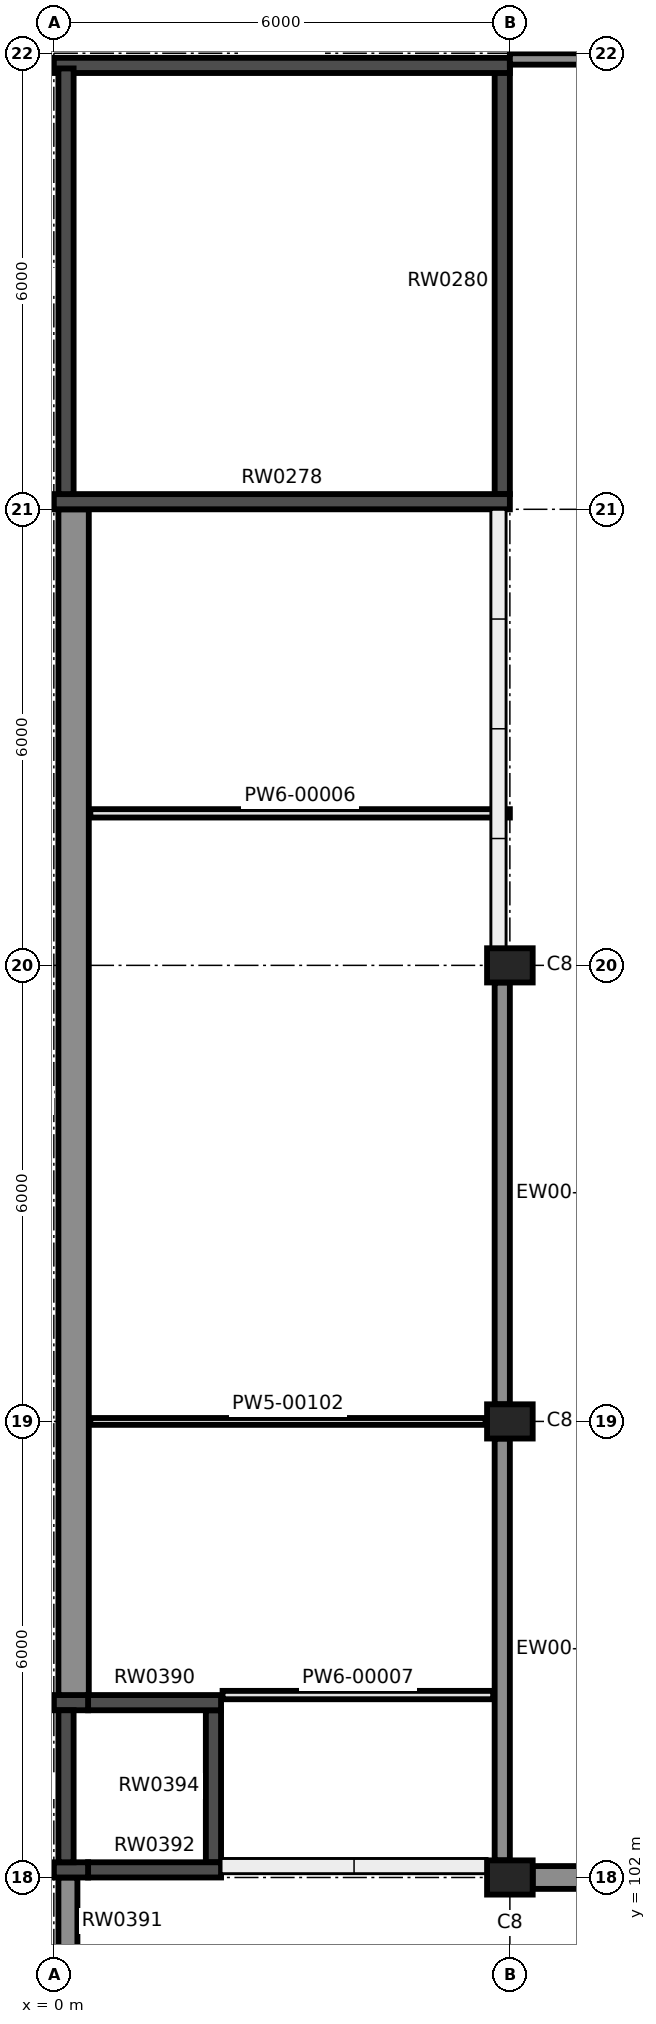
"""IFC4 building model, lengths in metres.
Left out: names, types, materials, properties, quantities, classifications, styles, units other than length and angle.
Written with IfcOpenShell. Run it as: python <this file> out.ifc"""

import sys

from ifc_helpers import new_model, si_unit, direction, frame, frame_2d, origin, origin_2d, place, context, subcontext, project, spatial, polyline, rectangle, outline, extrude, element, fill, save


model = new_model("IFC4")
c1 = context("Model", 3, precision=1e-05, world=origin(), true_north=direction((0.0, 1.0)))
c2 = subcontext(c1, "Body", "Model", "MODEL_VIEW")
j1 = project(units=[si_unit("LENGTHUNIT", "METRE"), si_unit("PLANEANGLEUNIT", "RADIAN")], contexts=[c1])
p1 = place(None, origin())
s1 = spatial("IfcSite", under=j1, at=p1, CompositionType="ELEMENT")
p2 = place(p1, origin())
s2 = spatial("IfcBuilding", under=s1, at=p2, CompositionType="ELEMENT")
p3 = place(p2, origin())
s3 = spatial("IfcBuildingStorey", under=s2, at=p3, CompositionType="ELEMENT", Elevation=0.0)
for number, where, z_axis, x_axis in (
    (1, (6.0, 102.0, -0.3), (0.0, 0.0, 1.0), (1.0, 0.0, 0.0)),
    (2, (6.0, 108.0, -0.3), (0.0, 0.0, 1.0), (1.0, 0.0, 0.0)),
    (3, (6.0, 114.0, -0.3), (0.0, 0.0, 1.0), (1.0, 0.0, 0.0)),
):
    element("IfcColumn", number, at=place(p3, frame(where, z_axis=z_axis, x_axis=x_axis)), inside=s3, PredefinedType="COLUMN", context=c2, shape_type="SweptSolid", body=[
        extrude(rectangle(XDim=0.6, YDim=0.45, at=origin_2d()), origin(), (0.0, 0.0, 1.0), 7.3),
    ])
p4 = place(p3, frame((0.0, 125.84, -0.3), z_axis=(0.0, 0.0, 1.0), x_axis=(1.0, 0.0, 0.0)))
e4 = element("IfcWall", 4, at=p4, inside=s3, PredefinedType="SHEAR", context=c2, shape_type="SweptSolid", body=[
    extrude(rectangle(XDim=6.0, YDim=0.2, at=frame_2d((3.0, 0.0))), origin(), (0.0, 0.0, 1.0), 7.3),
])
p5 = place(p4, frame((2.1, 0.0, 0.3)))
e5 = element("IfcOpeningElement", 5, at=p5, cuts=e4, PredefinedType="OPENING", context=c2, shape_type="SweptSolid", body=[
    extrude(rectangle(XDim=1.8, YDim=2.4, at=frame_2d((0.9, 1.2))), frame((0.0, 0.11, 0.0), z_axis=(0.0, -1.0, 0.0), x_axis=(1.0, 0.0, 0.0)), (0.0, 0.0, 1.0), 0.22),
])
p6 = place(p3, frame((0.0, 120.1, -0.3), z_axis=(0.0, 0.0, 1.0), x_axis=(1.0, 0.0, 0.0)))
e6 = element("IfcWall", 6, at=p6, inside=s3, PredefinedType="SHEAR", context=c2, shape_type="SweptSolid", body=[
    extrude(rectangle(XDim=6.0, YDim=0.2, at=frame_2d((3.0, 0.0))), origin(), (0.0, 0.0, 1.0), 7.3),
])
for number, where, z_axis, x_axis in (
    (7, (0.16, 120.2, -0.3), (0.0, 0.0, 1.0), (0.0, 1.0, 0.0)),
    (8, (5.9, 120.2, -0.3), (0.0, 0.0, 1.0), (0.0, 1.0, 0.0)),
):
    element("IfcWall", number, at=place(p3, frame(where, z_axis=z_axis, x_axis=x_axis)), inside=s3, PredefinedType="SHEAR", context=c2, shape_type="SweptSolid", body=[
        extrude(rectangle(XDim=5.6, YDim=0.2, at=frame_2d((2.8, 0.0))), origin(), (0.0, 0.0, 1.0), 7.3),
    ])
p7 = place(p3, frame((0.0, 104.3, -0.3), z_axis=(0.0, 0.0, 1.0), x_axis=(1.0, 0.0, 0.0)))
e9 = element("IfcWall", 9, at=p7, inside=s3, PredefinedType="SHEAR", context=c2, shape_type="SweptSolid", body=[
    extrude(rectangle(XDim=0.45, YDim=0.2, at=frame_2d((0.225, 0.0))), origin(), (0.0, 0.0, 1.0), 7.3),
])
p8 = place(p3, frame((0.45, 104.3, -1.4), z_axis=(0.0, 0.0, 1.0), x_axis=(1.0, 0.0, 0.0)))
e10 = element("IfcWall", 10, at=p8, inside=s3, PredefinedType="SHEAR", context=c2, shape_type="SweptSolid", body=[
    extrude(rectangle(XDim=1.75, YDim=0.2, at=frame_2d((0.875, 0.0))), origin(), (0.0, 0.0, 1.0), 8.4),
])
p9 = place(p8, frame((0.1, 0.0, 1.4)))
e11 = element("IfcOpeningElement", 11, at=p9, cuts=e10, PredefinedType="OPENING", context=c2, shape_type="SweptSolid", body=[
    extrude(rectangle(XDim=1.1, YDim=2.1, at=frame_2d((0.55, 1.05))), frame((0.0, 0.11, 0.0), z_axis=(0.0, -1.0, 0.0), x_axis=(1.0, 0.0, 0.0)), (0.0, 0.0, 1.0), 0.22),
])
p10 = place(p3, frame((0.0, 102.1, -0.3), z_axis=(0.0, 0.0, 1.0), x_axis=(1.0, 0.0, 0.0)))
e12 = element("IfcWall", 12, at=p10, inside=s3, PredefinedType="SHEAR", context=c2, shape_type="SweptSolid", body=[
    extrude(rectangle(XDim=0.45, YDim=0.2, at=frame_2d((0.225, 0.0))), origin(), (0.0, 0.0, 1.0), 7.3),
])
p11 = place(p3, frame((0.45, 102.1, -1.4), z_axis=(0.0, 0.0, 1.0), x_axis=(1.0, 0.0, 0.0)))
e13 = element("IfcWall", 13, at=p11, inside=s3, PredefinedType="SHEAR", context=c2, shape_type="SweptSolid", body=[
    extrude(rectangle(XDim=1.75, YDim=0.2, at=frame_2d((0.875, 0.0))), origin(), (0.0, 0.0, 1.0), 8.4),
])
p12 = place(p3, frame((0.16, 102.2, -0.3), z_axis=(0.0, 0.0, 1.0), x_axis=(0.0, 1.0, 0.0)))
e14 = element("IfcWall", 14, at=p12, inside=s3, PredefinedType="SHEAR", context=c2, shape_type="SweptSolid", body=[
    extrude(rectangle(XDim=2.0, YDim=0.2, at=frame_2d((1.0, 0.0))), origin(), (0.0, 0.0, 1.0), 7.3),
])
p13 = place(p3, frame((2.1, 102.2, -1.4), z_axis=(0.0, 0.0, 1.0), x_axis=(0.0, 1.0, 0.0)))
e15 = element("IfcWall", 15, at=p13, inside=s3, PredefinedType="SHEAR", context=c2, shape_type="SweptSolid", body=[
    extrude(rectangle(XDim=2.0, YDim=0.2, at=frame_2d((1.0, 0.0))), origin(), (0.0, 0.0, 1.0), 8.4),
])
p14 = place(p3, frame((0.26, 104.4, -0.3), z_axis=(0.0, 0.0, 1.0), x_axis=(0.0, 1.0, 0.0)))
e16 = element("IfcWall", 16, at=p14, inside=s3, PredefinedType="SOLIDWALL", context=c2, shape_type="SweptSolid", body=[
    extrude(rectangle(XDim=15.6, YDim=0.4, at=frame_2d((7.8, 0.0))), origin(), (0.0, 0.0, 1.0), 7.3),
])
p15 = place(p3, frame((0.185, 30.0, -0.3), z_axis=(0.0, 0.0, 1.0), x_axis=(0.0, 1.0, 0.0)))
e17 = element("IfcWall", 17, at=p15, inside=s3, PredefinedType="SOLIDWALL", context=c2, shape_type="SweptSolid", body=[
    extrude(rectangle(XDim=72.0, YDim=0.25, at=frame_2d((36.0, 0.0))), origin(), (0.0, 0.0, 1.0), 3.3),
])
p16 = place(p3, frame((5.9, 113.775, 0.0), z_axis=(0.0, 0.0, 1.0), x_axis=(0.0, -1.0, 0.0)))
e18 = element("IfcWall", 18, at=p16, inside=s3, PredefinedType="SOLIDWALL", context=c2, shape_type="SweptSolid", body=[
    extrude(rectangle(XDim=5.55, YDim=0.2, at=frame_2d((2.775, 0.0))), origin(), (0.0, 0.0, 1.0), 6.15),
])
p17 = place(p16, frame((1.255, 0.0, 0.0)))
e19 = element("IfcOpeningElement", 19, at=p17, cuts=e18, PredefinedType="OPENING", context=c2, shape_type="SweptSolid", body=[
    extrude(rectangle(XDim=1.1, YDim=2.4, at=frame_2d((0.55, 1.2))), frame((0.0, 0.11, 0.0), z_axis=(0.0, -1.0, 0.0), x_axis=(1.0, 0.0, 0.0)), (0.0, 0.0, 1.0), 0.22),
])
p18 = place(p16, frame((1.255, 0.0, 2.5)))
e20 = element("IfcOpeningElement", 20, at=p18, cuts=e18, PredefinedType="OPENING", context=c2, shape_type="SweptSolid", body=[
    extrude(rectangle(XDim=1.1, YDim=3.3, at=frame_2d((0.55, 1.65))), frame((0.0, 0.11, 0.0), z_axis=(0.0, -1.0, 0.0), x_axis=(1.0, 0.0, 0.0)), (0.0, 0.0, 1.0), 0.22),
])
p19 = place(p16, frame((0.2, 0.0, 0.1)))
e21 = element("IfcOpeningElement", 21, at=p19, cuts=e18, PredefinedType="OPENING", context=c2, shape_type="SweptSolid", body=[
    extrude(rectangle(XDim=1.055, YDim=5.7, at=frame_2d((0.527, 2.85))), frame((0.0, 0.11, 0.0), z_axis=(0.0, -1.0, 0.0), x_axis=(1.0, 0.0, 0.0)), (0.0, 0.0, 1.0), 0.22),
])
p20 = place(p16, frame((2.355, 0.0, 0.1)))
e22 = element("IfcOpeningElement", 22, at=p20, cuts=e18, PredefinedType="OPENING", context=c2, shape_type="SweptSolid", body=[
    extrude(rectangle(XDim=2.995, YDim=5.7, at=frame_2d((1.498, 2.85))), frame((0.0, 0.11, 0.0), z_axis=(0.0, -1.0, 0.0), x_axis=(1.0, 0.0, 0.0)), (0.0, 0.0, 1.0), 0.22),
])
p21 = place(p3, frame((5.9, 107.775, 0.0), z_axis=(0.0, 0.0, 1.0), x_axis=(0.0, -1.0, 0.0)))
e23 = element("IfcWall", 23, at=p21, inside=s3, PredefinedType="SOLIDWALL", context=c2, shape_type="SweptSolid", body=[
    extrude(rectangle(XDim=5.55, YDim=0.2, at=frame_2d((2.775, 0.0))), origin(), (0.0, 0.0, 1.0), 6.15),
])
p22 = place(p21, frame((1.055, 0.0, 0.0)))
e24 = element("IfcOpeningElement", 24, at=p22, cuts=e23, PredefinedType="OPENING", context=c2, shape_type="SweptSolid", body=[
    extrude(rectangle(XDim=1.1, YDim=2.4, at=frame_2d((0.55, 1.2))), frame((0.0, 0.11, 0.0), z_axis=(0.0, -1.0, 0.0), x_axis=(1.0, 0.0, 0.0)), (0.0, 0.0, 1.0), 0.22),
])
p23 = place(p21, frame((1.055, 0.0, 2.5)))
e25 = element("IfcOpeningElement", 25, at=p23, cuts=e23, PredefinedType="OPENING", context=c2, shape_type="SweptSolid", body=[
    extrude(rectangle(XDim=1.1, YDim=3.3, at=frame_2d((0.55, 1.65))), frame((0.0, 0.11, 0.0), z_axis=(0.0, -1.0, 0.0), x_axis=(1.0, 0.0, 0.0)), (0.0, 0.0, 1.0), 0.22),
])
p24 = place(p21, frame((0.2, 0.0, 0.1)))
e26 = element("IfcOpeningElement", 26, at=p24, cuts=e23, PredefinedType="OPENING", context=c2, shape_type="SweptSolid", body=[
    extrude(rectangle(XDim=0.855, YDim=5.7, at=frame_2d((0.427, 2.85))), frame((0.0, 0.11, 0.0), z_axis=(0.0, -1.0, 0.0), x_axis=(1.0, 0.0, 0.0)), (0.0, 0.0, 1.0), 0.22),
])
p25 = place(p21, frame((2.155, 0.0, 0.1)))
e27 = element("IfcOpeningElement", 27, at=p25, cuts=e23, PredefinedType="OPENING", context=c2, shape_type="SweptSolid", body=[
    extrude(rectangle(XDim=0.97, YDim=5.7, at=frame_2d((0.485, 2.85))), frame((0.0, 0.11, 0.0), z_axis=(0.0, -1.0, 0.0), x_axis=(1.0, 0.0, 0.0)), (0.0, 0.0, 1.0), 0.22),
])
p26 = place(p21, frame((3.625, 0.0, 0.1)))
e28 = element("IfcOpeningElement", 28, at=p26, cuts=e23, PredefinedType="OPENING", context=c2, shape_type="SweptSolid", body=[
    extrude(rectangle(XDim=1.725, YDim=5.7, at=frame_2d((0.863, 2.85))), frame((0.0, 0.11, 0.0), z_axis=(0.0, -1.0, 0.0), x_axis=(1.0, 0.0, 0.0)), (0.0, 0.0, 1.0), 0.22),
])
p27 = place(p3, frame((6.0, 126.0, 0.0), z_axis=(0.0, 1.0, 0.0), x_axis=(0.0, 0.0, 1.0)))
e29 = element("IfcWall", 29, at=p27, inside=s3, PredefinedType="SOLIDWALL", context=c2, shape_type="SweptSolid", body=[
    extrude(outline(polyline([(0.0, 0.0), (6.75, 0.0), (6.75, 5.7), (0.0, 5.7), (0.0, 5.45), (4.0, 5.45), (4.407, 5.418), (4.803, 5.323), (5.18, 5.167), (5.528, 4.953), (5.838, 4.688), (6.103, 4.378), (6.317, 4.03), (6.473, 3.653), (6.568, 3.257), (6.6, 2.85), (6.568, 2.443), (6.473, 2.047), (6.317, 1.67), (6.103, 1.322), (5.838, 1.012), (5.528, 0.747), (5.18, 0.533), (4.803, 0.377), (4.407, 0.282), (4.0, 0.25), (0.0, 0.25), (0.0, 0.0)])), origin(), (0.0, 0.0, -1.0), 0.3),
])
p28 = place(p3, frame((6.3, 102.0, 6.05), z_axis=(0.0, -1.0, 0.0), x_axis=(0.0, 0.0, -1.0)))
e30 = element("IfcWall", 30, at=p28, inside=s3, PredefinedType="SOLIDWALL", context=c2, shape_type="SweptSolid", body=[
    extrude(outline(polyline([(0.0, 0.0), (6.05, 0.0), (6.05, 0.25), (2.05, 0.25), (1.677, 0.285), (1.318, 0.389), (0.984, 0.559), (0.688, 0.787), (0.44, 1.068), (0.248, 1.389), (0.12, 1.741), (0.06, 2.11), (0.07, 2.484), (0.15, 2.85), (0.07, 3.216), (0.06, 3.59), (0.12, 3.959), (0.248, 4.311), (0.44, 4.632), (0.688, 4.913), (0.984, 5.141), (1.318, 5.311), (1.677, 5.415), (2.05, 5.45), (6.05, 5.45), (6.05, 5.7), (0.0, 5.7), (0.0, 0.0)])), origin(), (0.0, 0.0, -1.0), 0.3),
])
p29 = place(p3, frame((0.48, 116.0, 0.0), z_axis=(0.0, 0.0, 1.0), x_axis=(1.0, 0.0, 0.0)))
e31 = element("IfcWall", 31, at=p29, inside=s3, PredefinedType="PARTITIONING", context=c2, shape_type="SweptSolid", body=[
    extrude(rectangle(XDim=5.52, YDim=0.11, at=frame_2d((2.76, 0.0))), origin(), (0.0, 0.0, 1.0), 6.15),
])
p30 = place(p29, frame((2.07, 0.0, 0.0)))
e32 = element("IfcOpeningElement", 32, at=p30, cuts=e31, PredefinedType="OPENING", context=c2, shape_type="SweptSolid", body=[
    extrude(rectangle(XDim=0.92, YDim=2.04, at=frame_2d((0.46, 1.02))), frame((0.0, 0.065, 0.0), z_axis=(0.0, -1.0, 0.0), x_axis=(1.0, 0.0, 0.0)), (0.0, 0.0, 1.0), 0.13),
])
p31 = place(p3, frame((2.22, 104.4, 0.0), z_axis=(0.0, 0.0, 1.0), x_axis=(1.0, 0.0, 0.0)))
e33 = element("IfcWall", 33, at=p31, inside=s3, PredefinedType="PARTITIONING", context=c2, shape_type="SweptSolid", body=[
    extrude(rectangle(XDim=3.56, YDim=0.11, at=frame_2d((1.78, 0.0))), origin(), (0.0, 0.0, 1.0), 6.75),
])
p32 = place(p31, frame((1.53, 0.0, 0.0)))
e34 = element("IfcOpeningElement", 34, at=p32, cuts=e33, PredefinedType="OPENING", context=c2, shape_type="SweptSolid", body=[
    extrude(rectangle(XDim=0.75, YDim=2.04, at=frame_2d((0.375, 1.02))), frame((0.0, 0.065, 0.0), z_axis=(0.0, -1.0, 0.0), x_axis=(1.0, 0.0, 0.0)), (0.0, 0.0, 1.0), 0.13),
])
p33 = place(p3, frame((0.48, 108.0, 0.0), z_axis=(0.0, 0.0, 1.0), x_axis=(1.0, 0.0, 0.0)))
e35 = element("IfcWall", 35, at=p33, inside=s3, PredefinedType="PARTITIONING", context=c2, shape_type="SweptSolid", body=[
    extrude(rectangle(XDim=5.2, YDim=0.09, at=frame_2d((2.6, 0.0))), origin(), (0.0, 0.0, 1.0), 6.15),
])
p34 = place(p33, frame((2.07, 0.0, 0.0)))
e36 = element("IfcOpeningElement", 36, at=p34, cuts=e35, PredefinedType="OPENING", context=c2, shape_type="SweptSolid", body=[
    extrude(rectangle(XDim=0.92, YDim=2.04, at=frame_2d((0.46, 1.02))), frame((0.0, 0.055, 0.0), z_axis=(0.0, -1.0, 0.0), x_axis=(1.0, 0.0, 0.0)), (0.0, 0.0, 1.0), 0.11),
])
p35 = place(p17, origin())
e37 = element("IfcDoor", 37, at=p35, inside=s3, OperationType="SINGLE_SWING_RIGHT", PredefinedType="DOOR", context=c2, shape_type="SweptSolid", body=[
    extrude(rectangle(XDim=1.1, YDim=2.4, at=frame_2d((0.55, 1.2))), frame((0.0, 0.025, 0.0), z_axis=(0.0, -1.0, 0.0), x_axis=(1.0, 0.0, 0.0)), (0.0, 0.0, 1.0), 0.05),
])
fill(e19, e37)
p36 = place(p18, origin())
e38 = element("IfcWindow", 38, at=p36, inside=s3, PartitioningType="SINGLE_PANEL", PredefinedType="WINDOW", context=c2, shape_type="SweptSolid", body=[
    extrude(rectangle(XDim=1.1, YDim=3.3, at=frame_2d((0.55, 1.65))), frame((0.0, 0.03, 0.0), z_axis=(0.0, -1.0, 0.0), x_axis=(1.0, 0.0, 0.0)), (0.0, 0.0, 1.0), 0.06),
])
fill(e20, e38)
p37 = place(p19, origin())
e39 = element("IfcWindow", 39, at=p37, inside=s3, PartitioningType="SINGLE_PANEL", PredefinedType="WINDOW", context=c2, shape_type="SweptSolid", body=[
    extrude(rectangle(XDim=1.055, YDim=5.7, at=frame_2d((0.527, 2.85))), frame((0.0, 0.03, 0.0), z_axis=(0.0, -1.0, 0.0), x_axis=(1.0, 0.0, 0.0)), (0.0, 0.0, 1.0), 0.06),
])
fill(e21, e39)
p38 = place(p20, origin())
e40 = element("IfcWindow", 40, at=p38, inside=s3, PartitioningType="SINGLE_PANEL", PredefinedType="WINDOW", context=c2, shape_type="SweptSolid", body=[
    extrude(rectangle(XDim=2.995, YDim=5.7, at=frame_2d((1.498, 2.85))), frame((0.0, 0.03, 0.0), z_axis=(0.0, -1.0, 0.0), x_axis=(1.0, 0.0, 0.0)), (0.0, 0.0, 1.0), 0.06),
])
fill(e22, e40)
p39 = place(p22, origin())
e41 = element("IfcDoor", 41, at=p39, inside=s3, OperationType="SINGLE_SWING_LEFT", PredefinedType="DOOR", context=c2, shape_type="SweptSolid", body=[
    extrude(rectangle(XDim=1.1, YDim=2.4, at=frame_2d((0.55, 1.2))), frame((0.0, 0.025, 0.0), z_axis=(0.0, -1.0, 0.0), x_axis=(1.0, 0.0, 0.0)), (0.0, 0.0, 1.0), 0.05),
])
fill(e24, e41)
p40 = place(p23, origin())
e42 = element("IfcWindow", 42, at=p40, inside=s3, PartitioningType="SINGLE_PANEL", PredefinedType="WINDOW", context=c2, shape_type="SweptSolid", body=[
    extrude(rectangle(XDim=1.1, YDim=3.3, at=frame_2d((0.55, 1.65))), frame((0.0, 0.03, 0.0), z_axis=(0.0, -1.0, 0.0), x_axis=(1.0, 0.0, 0.0)), (0.0, 0.0, 1.0), 0.06),
])
fill(e25, e42)
p41 = place(p24, origin())
e43 = element("IfcWindow", 43, at=p41, inside=s3, PartitioningType="SINGLE_PANEL", PredefinedType="WINDOW", context=c2, shape_type="SweptSolid", body=[
    extrude(rectangle(XDim=0.855, YDim=5.7, at=frame_2d((0.427, 2.85))), frame((0.0, 0.03, 0.0), z_axis=(0.0, -1.0, 0.0), x_axis=(1.0, 0.0, 0.0)), (0.0, 0.0, 1.0), 0.06),
])
fill(e26, e43)
p42 = place(p25, origin())
e44 = element("IfcWindow", 44, at=p42, inside=s3, PartitioningType="SINGLE_PANEL", PredefinedType="WINDOW", context=c2, shape_type="SweptSolid", body=[
    extrude(rectangle(XDim=0.97, YDim=5.7, at=frame_2d((0.485, 2.85))), frame((0.0, 0.03, 0.0), z_axis=(0.0, -1.0, 0.0), x_axis=(1.0, 0.0, 0.0)), (0.0, 0.0, 1.0), 0.06),
])
fill(e27, e44)
p43 = place(p26, origin())
e45 = element("IfcWindow", 45, at=p43, inside=s3, PartitioningType="SINGLE_PANEL", PredefinedType="WINDOW", context=c2, shape_type="SweptSolid", body=[
    extrude(rectangle(XDim=1.725, YDim=5.7, at=frame_2d((0.863, 2.85))), frame((0.0, 0.03, 0.0), z_axis=(0.0, -1.0, 0.0), x_axis=(1.0, 0.0, 0.0)), (0.0, 0.0, 1.0), 0.06),
])
fill(e28, e45)
p44 = place(p5, origin())
e46 = element("IfcDoor", 46, at=p44, inside=s3, OperationType="DOUBLE_DOOR_SINGLE_SWING", PredefinedType="DOOR", context=c2, shape_type="SweptSolid", body=[
    extrude(rectangle(XDim=1.8, YDim=2.4, at=frame_2d((0.9, 1.2))), frame((0.0, 0.025, 0.0), z_axis=(0.0, -1.0, 0.0), x_axis=(1.0, 0.0, 0.0)), (0.0, 0.0, 1.0), 0.05),
])
fill(e5, e46)
p45 = place(p34, origin())
e47 = element("IfcDoor", 47, at=p45, inside=s3, OperationType="SINGLE_SWING_LEFT", PredefinedType="DOOR", context=c2, shape_type="SweptSolid", body=[
    extrude(rectangle(XDim=0.92, YDim=2.04, at=frame_2d((0.46, 1.02))), frame((0.0, 0.025, 0.0), z_axis=(0.0, -1.0, 0.0), x_axis=(1.0, 0.0, 0.0)), (0.0, 0.0, 1.0), 0.05),
])
fill(e36, e47)
p46 = place(p30, origin())
e48 = element("IfcDoor", 48, at=p46, inside=s3, OperationType="SINGLE_SWING_RIGHT", PredefinedType="DOOR", context=c2, shape_type="SweptSolid", body=[
    extrude(rectangle(XDim=0.92, YDim=2.04, at=frame_2d((0.46, 1.02))), frame((0.0, 0.025, 0.0), z_axis=(0.0, -1.0, 0.0), x_axis=(1.0, 0.0, 0.0)), (0.0, 0.0, 1.0), 0.05),
])
fill(e32, e48)
p47 = place(p32, frame((0.75, 0.0, 0.0), z_axis=(0.0, 0.0, 1.0), x_axis=(-1.0, 0.0, 0.0)))
e49 = element("IfcDoor", 49, at=p47, inside=s3, OperationType="SINGLE_SWING_LEFT", PredefinedType="DOOR", context=c2, shape_type="SweptSolid", body=[
    extrude(rectangle(XDim=0.75, YDim=2.04, at=frame_2d((0.375, 1.02))), frame((0.0, 0.025, 0.0), z_axis=(0.0, -1.0, 0.0), x_axis=(1.0, 0.0, 0.0)), (0.0, 0.0, 1.0), 0.05),
])
fill(e34, e49)
p48 = place(p9, origin())
e50 = element("IfcDoor", 50, at=p48, inside=s3, OperationType="DOUBLE_DOOR_SLIDING", PredefinedType="DOOR", context=c2, shape_type="SweptSolid", body=[
    extrude(rectangle(XDim=1.1, YDim=2.1, at=frame_2d((0.55, 1.05))), frame((0.0, 0.025, 0.0), z_axis=(0.0, -1.0, 0.0), x_axis=(1.0, 0.0, 0.0)), (0.0, 0.0, 1.0), 0.05),
])
fill(e11, e50)
save(model, sys.argv[1])
